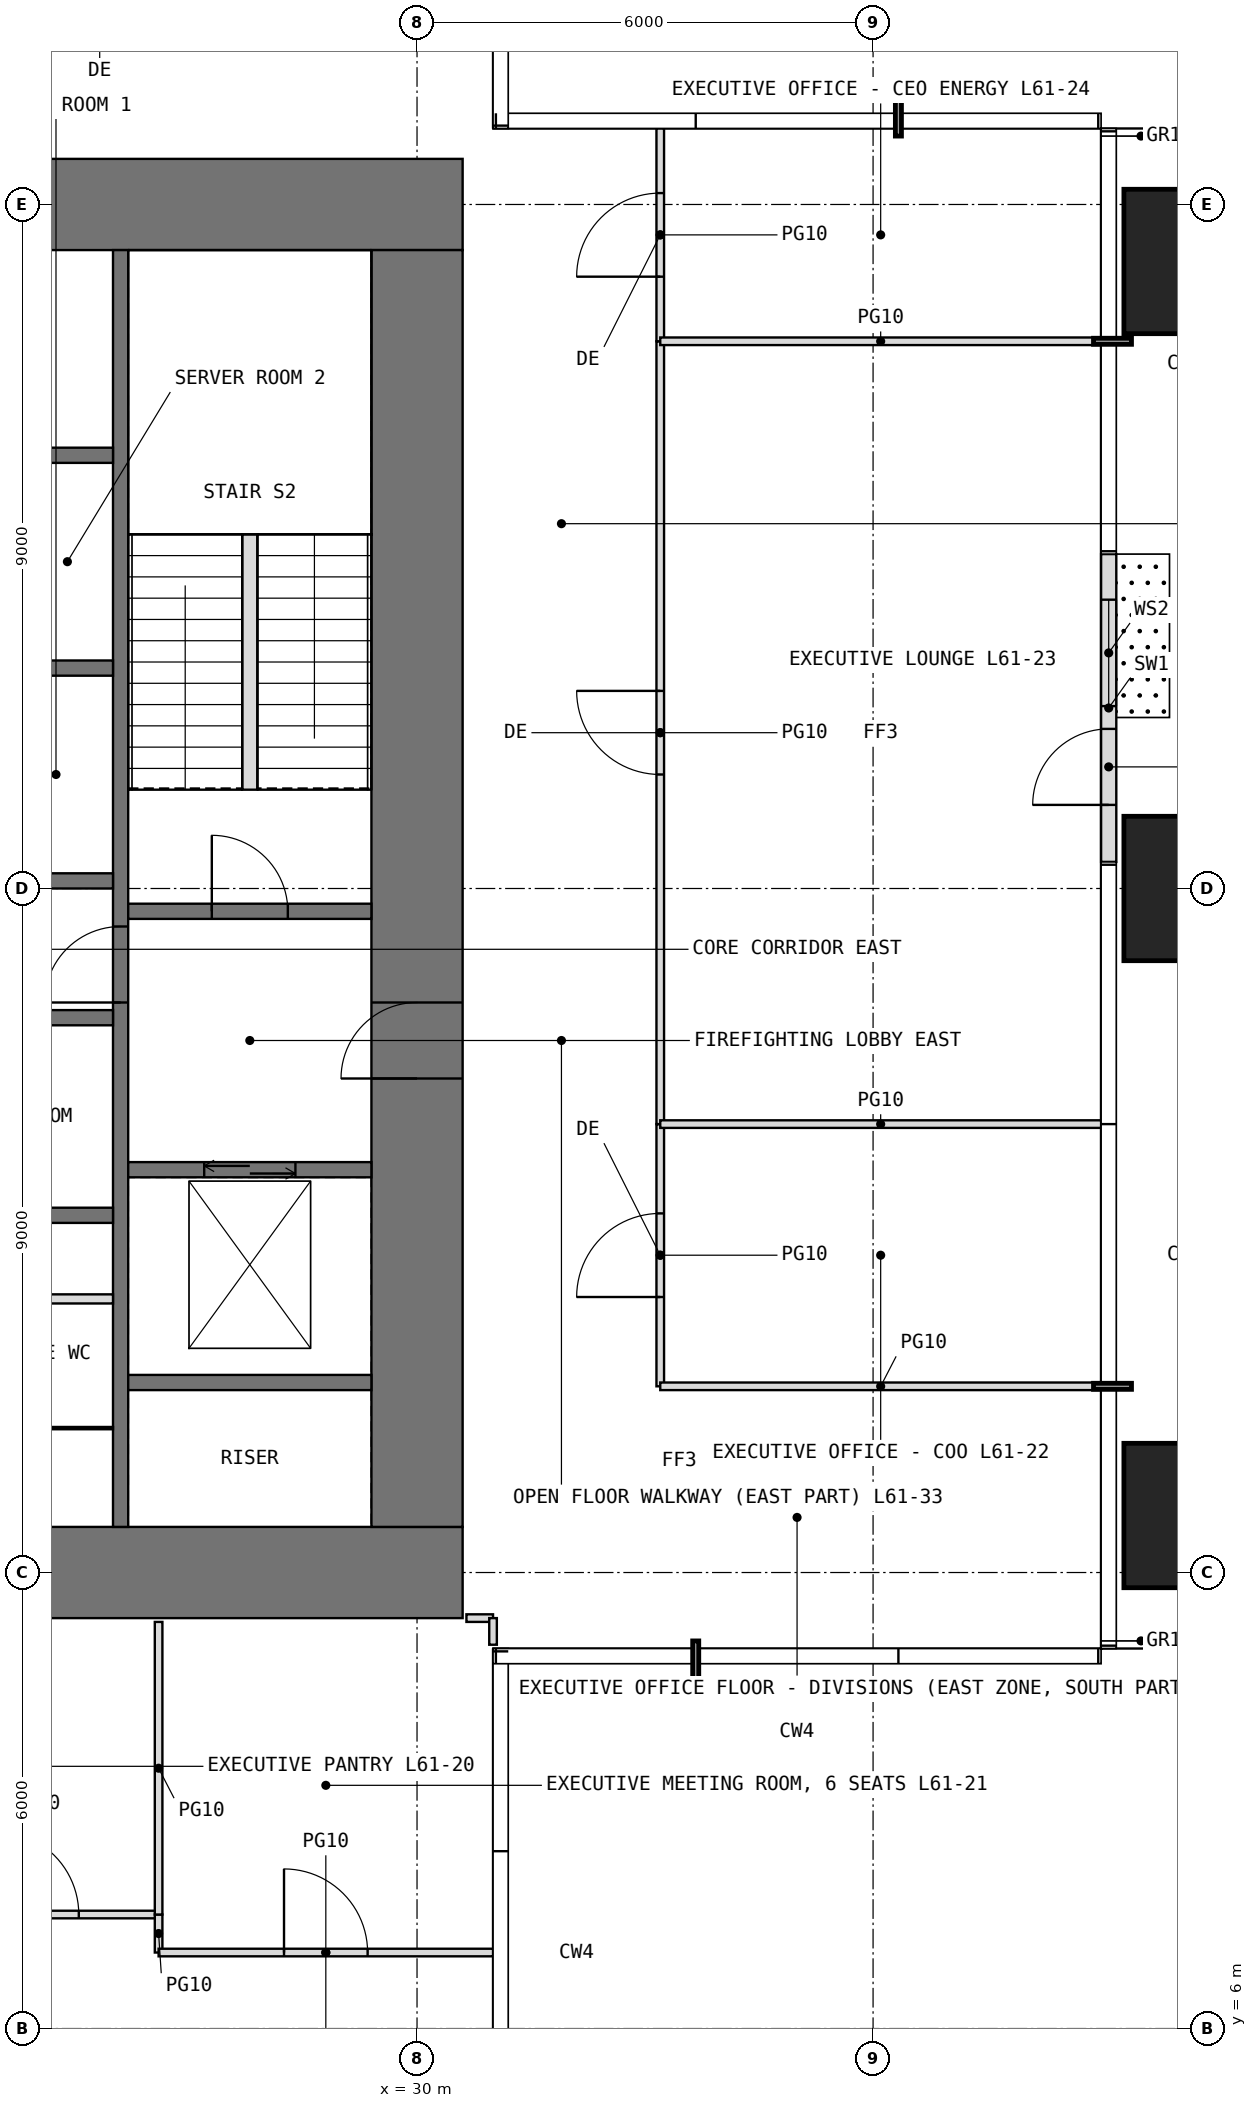
"""IFC4 building model, lengths in metres.
Left out: names, types, materials, properties, quantities, classifications, styles, units other than length and angle.
Written with IfcOpenShell. Run it as: python <this file> out.ifc"""

import sys

from ifc_helpers import new_model, si_unit, direction, frame, frame_2d, origin, origin_2d, place, context, subcontext, project, spatial, rectangle, extrude, element, fill, save


model = new_model("IFC4")
c1 = context("Model", 3, precision=1e-05, world=origin(), true_north=direction((0.0, 1.0)))
c2 = subcontext(c1, "Body", "Model", "MODEL_VIEW")
j1 = project(units=[si_unit("LENGTHUNIT", "METRE"), si_unit("PLANEANGLEUNIT", "RADIAN")], contexts=[c1])
p1 = place(None, origin())
s1 = spatial("IfcSite", under=j1, at=p1, CompositionType="ELEMENT")
p2 = place(p1, origin())
s2 = spatial("IfcBuilding", under=s1, at=p2, CompositionType="ELEMENT")
p3 = place(p2, frame((0.0, 0.0, 256.6)))
s3 = spatial("IfcBuildingStorey", under=s2, at=p3, CompositionType="ELEMENT", Elevation=256.6)
for number, where, z_axis, x_axis in (
    (1, (40.25, 12.75, 0.0), (0.0, 0.0, 1.0), (1.0, 0.0, 0.0)),
    (2, (40.25, 21.0, 0.0), (0.0, 0.0, 1.0), (1.0, 0.0, 0.0)),
    (3, (40.25, 29.25, 0.0), (0.0, 0.0, 1.0), (1.0, 0.0, 0.0)),
):
    element("IfcColumn", number, at=place(p3, frame(where, z_axis=z_axis, x_axis=x_axis)), inside=s3, PredefinedType="COLUMN", context=c2, shape_type="SweptSolid", body=[
        extrude(rectangle(XDim=1.9, YDim=1.9, at=origin_2d()), origin(), (0.0, 0.0, 1.0), 4.2),
    ])
p4 = place(p3, frame((39.1, 21.35, 0.0), z_axis=(0.0, 0.0, 1.0), x_axis=(0.0, 1.0, 0.0)))
e4 = element("IfcWall", 4, at=p4, inside=s3, PredefinedType="USERDEFINED", context=c2, shape_type="SweptSolid", body=[
    extrude(rectangle(XDim=4.05, YDim=0.2, at=frame_2d((2.025, 0.0))), origin(), (0.0, 0.0, 1.0), 3.95),
])
p5 = place(p4, frame((0.75, 0.0, 0.0)))
e5 = element("IfcOpeningElement", 5, at=p5, cuts=e4, PredefinedType="OPENING", context=c2, shape_type="SweptSolid", body=[
    extrude(rectangle(XDim=1.0, YDim=2.4, at=frame_2d((0.5, 1.2))), frame((0.0, 0.11, 0.0), z_axis=(0.0, -1.0, 0.0), x_axis=(1.0, 0.0, 0.0)), (0.0, 0.0, 1.0), 0.22),
])
p6 = place(p4, frame((2.05, 0.0, 0.3)))
e6 = element("IfcOpeningElement", 6, at=p6, cuts=e4, PredefinedType="OPENING", context=c2, shape_type="SweptSolid", body=[
    extrude(rectangle(XDim=1.4, YDim=2.7, at=frame_2d((0.7, 1.35))), frame((0.0, 0.11, 0.0), z_axis=(0.0, -1.0, 0.0), x_axis=(1.0, 0.0, 0.0)), (0.0, 0.0, 1.0), 0.22),
])
p7 = place(p3, frame((11.4, 12.0, -0.05), z_axis=(0.0, 0.0, 1.0), x_axis=(1.0, 0.0, 0.0)))
e7 = element("IfcWall", 7, at=p7, inside=s3, PredefinedType="SHEAR", context=c2, shape_type="SweptSolid", body=[
    extrude(rectangle(XDim=19.2, YDim=1.2, at=frame_2d((9.6, 0.0))), origin(), (0.0, 0.0, 1.0), 4.2),
])
p8 = place(p7, frame((8.6, 0.0, 0.05)))
e8 = element("IfcOpeningElement", 8, at=p8, cuts=e7, PredefinedType="OPENING", context=c2, shape_type="SweptSolid", body=[
    extrude(rectangle(XDim=2.0, YDim=2.2, at=frame_2d((1.0, 1.1))), frame((0.0, 0.61, 0.0), z_axis=(0.0, -1.0, 0.0), x_axis=(1.0, 0.0, 0.0)), (0.0, 0.0, 1.0), 1.22),
])
p9 = place(p3, frame((11.4, 30.0, -0.05), z_axis=(0.0, 0.0, 1.0), x_axis=(1.0, 0.0, 0.0)))
e9 = element("IfcWall", 9, at=p9, inside=s3, PredefinedType="SHEAR", context=c2, shape_type="SweptSolid", body=[
    extrude(rectangle(XDim=19.2, YDim=1.2, at=frame_2d((9.6, 0.0))), origin(), (0.0, 0.0, 1.0), 4.2),
])
p10 = place(p9, frame((8.6, 0.0, 0.05)))
e10 = element("IfcOpeningElement", 10, at=p10, cuts=e9, PredefinedType="OPENING", context=c2, shape_type="SweptSolid", body=[
    extrude(rectangle(XDim=2.0, YDim=2.2, at=frame_2d((1.0, 1.1))), frame((0.0, 0.61, 0.0), z_axis=(0.0, -1.0, 0.0), x_axis=(1.0, 0.0, 0.0)), (0.0, 0.0, 1.0), 1.22),
])
p11 = place(p3, frame((30.0, 12.6, -0.05), z_axis=(0.0, 0.0, 1.0), x_axis=(0.0, 1.0, 0.0)))
e11 = element("IfcWall", 11, at=p11, inside=s3, PredefinedType="SHEAR", context=c2, shape_type="SweptSolid", body=[
    extrude(rectangle(XDim=16.8, YDim=1.2, at=frame_2d((8.4, 0.0))), origin(), (0.0, 0.0, 1.0), 4.2),
])
p12 = place(p11, frame((5.9, 0.0, 0.05)))
e12 = element("IfcOpeningElement", 12, at=p12, cuts=e11, PredefinedType="OPENING", context=c2, shape_type="SweptSolid", body=[
    extrude(rectangle(XDim=1.0, YDim=2.2, at=frame_2d((0.5, 1.1))), frame((0.0, 0.61, 0.0), z_axis=(0.0, -1.0, 0.0), x_axis=(1.0, 0.0, 0.0)), (0.0, 0.0, 1.0), 1.22),
])
p13 = place(p3, frame((26.1, 12.6, -0.05), z_axis=(0.0, 0.0, 1.0), x_axis=(0.0, 1.0, 0.0)))
e13 = element("IfcWall", 13, at=p13, inside=s3, PredefinedType="SHEAR", context=c2, shape_type="SweptSolid", body=[
    extrude(rectangle(XDim=16.8, YDim=0.2, at=frame_2d((8.4, 0.0))), origin(), (0.0, 0.0, 1.0), 4.2),
])
p14 = place(p13, frame((6.9, 0.0, 0.05)))
e14 = element("IfcOpeningElement", 14, at=p14, cuts=e13, PredefinedType="OPENING", context=c2, shape_type="SweptSolid", body=[
    extrude(rectangle(XDim=1.0, YDim=2.2, at=frame_2d((0.5, 1.1))), frame((0.0, 0.11, 0.0), z_axis=(0.0, -1.0, 0.0), x_axis=(1.0, 0.0, 0.0)), (0.0, 0.0, 1.0), 0.22),
])
for number, where, z_axis, x_axis in (
    (15, (22.8, 16.7, -0.05), (0.0, 0.0, 1.0), (1.0, 0.0, 0.0)),
    (16, (22.8, 19.3, -0.05), (0.0, 0.0, 1.0), (1.0, 0.0, 0.0)),
    (17, (22.8, 21.1, -0.05), (0.0, 0.0, 1.0), (1.0, 0.0, 0.0)),
    (18, (22.8, 23.9, -0.05), (0.0, 0.0, 1.0), (1.0, 0.0, 0.0)),
    (19, (22.8, 26.7, -0.05), (0.0, 0.0, 1.0), (1.0, 0.0, 0.0)),
    (20, (26.2, 14.5, -0.05), (0.0, 0.0, 1.0), (1.0, 0.0, 0.0)),
):
    element("IfcWall", number, at=place(p3, frame(where, z_axis=z_axis, x_axis=x_axis)), inside=s3, PredefinedType="SHEAR", context=c2, shape_type="SweptSolid", body=[
        extrude(rectangle(XDim=3.2, YDim=0.2, at=frame_2d((1.6, 0.0))), origin(), (0.0, 0.0, 1.0), 4.2),
    ])
p15 = place(p3, frame((26.2, 17.3, -0.05), z_axis=(0.0, 0.0, 1.0), x_axis=(1.0, 0.0, 0.0)))
e21 = element("IfcWall", 21, at=p15, inside=s3, PredefinedType="SHEAR", context=c2, shape_type="SweptSolid", body=[
    extrude(rectangle(XDim=3.2, YDim=0.2, at=frame_2d((1.6, 0.0))), origin(), (0.0, 0.0, 1.0), 4.2),
])
p16 = place(p15, frame((1.0, 0.0, 0.05)))
e22 = element("IfcOpeningElement", 22, at=p16, cuts=e21, PredefinedType="OPENING", context=c2, shape_type="SweptSolid", body=[
    extrude(rectangle(XDim=1.2, YDim=2.2, at=frame_2d((0.6, 1.1))), frame((0.0, 0.11, 0.0), z_axis=(0.0, -1.0, 0.0), x_axis=(1.0, 0.0, 0.0)), (0.0, 0.0, 1.0), 0.22),
])
p17 = place(p3, frame((26.2, 20.7, -0.05), z_axis=(0.0, 0.0, 1.0), x_axis=(1.0, 0.0, 0.0)))
e23 = element("IfcWall", 23, at=p17, inside=s3, PredefinedType="SHEAR", context=c2, shape_type="SweptSolid", body=[
    extrude(rectangle(XDim=3.2, YDim=0.2, at=frame_2d((1.6, 0.0))), origin(), (0.0, 0.0, 1.0), 4.2),
])
p18 = place(p17, frame((1.1, 0.0, 0.05)))
e24 = element("IfcOpeningElement", 24, at=p18, cuts=e23, PredefinedType="OPENING", context=c2, shape_type="SweptSolid", body=[
    extrude(rectangle(XDim=1.0, YDim=2.2, at=frame_2d((0.5, 1.1))), frame((0.0, 0.11, 0.0), z_axis=(0.0, -1.0, 0.0), x_axis=(1.0, 0.0, 0.0)), (0.0, 0.0, 1.0), 0.22),
])
p19 = place(p3, frame((22.8, 15.6, 0.0), z_axis=(0.0, 0.0, 1.0), x_axis=(1.0, 0.0, 0.0)))
e25 = element("IfcWall", 25, at=p19, inside=s3, PredefinedType="PARTITIONING", context=c2, shape_type="SweptSolid", body=[
    extrude(rectangle(XDim=3.2, YDim=0.12, at=frame_2d((1.6, 0.0))), origin(), (0.0, 0.0, 1.0), 3.95),
])
p20 = place(p3, frame((24.6, 13.9, 0.0), z_axis=(0.0, 0.0, 1.0), x_axis=(1.0, 0.0, 0.0)))
e26 = element("IfcWall", 26, at=p20, inside=s3, PredefinedType="PARTITIONING", context=c2, shape_type="SweptSolid", body=[
    extrude(rectangle(XDim=1.4, YDim=0.03, at=frame_2d((0.7, 0.0))), origin(), (0.0, 0.0, 1.0), 3.95),
])
p21 = place(p3, frame((23.4, 7.5, 0.0), z_axis=(0.0, 0.0, 1.0), x_axis=(1.0, 0.0, 0.0)))
e27 = element("IfcWall", 27, at=p21, inside=s3, PredefinedType="PARTITIONING", context=c2, shape_type="SweptSolid", body=[
    extrude(rectangle(XDim=3.2, YDim=0.1, at=frame_2d((1.6, 0.0))), origin(), (0.0, 0.0, 1.0), 3.95),
])
p22 = place(p21, frame((1.05, 0.0, 0.0)))
e28 = element("IfcOpeningElement", 28, at=p22, cuts=e27, PredefinedType="OPENING", context=c2, shape_type="SweptSolid", body=[
    extrude(rectangle(XDim=1.1, YDim=2.3, at=frame_2d((0.55, 1.15))), frame((0.0, 0.06, 0.0), z_axis=(0.0, -1.0, 0.0), x_axis=(1.0, 0.0, 0.0)), (0.0, 0.0, 1.0), 0.12),
])
p23 = place(p3, frame((26.6, 7.0, 0.0), z_axis=(0.0, 0.0, 1.0), x_axis=(0.0, 1.0, 0.0)))
e29 = element("IfcWall", 29, at=p23, inside=s3, PredefinedType="PARTITIONING", context=c2, shape_type="SweptSolid", body=[
    extrude(rectangle(XDim=0.5, YDim=0.1, at=frame_2d((0.25, 0.0))), origin(), (0.0, 0.0, 1.0), 3.95),
])
p24 = place(p3, frame((26.6, 7.0, 0.0), z_axis=(0.0, 0.0, 1.0), x_axis=(1.0, 0.0, 0.0)))
e30 = element("IfcWall", 30, at=p24, inside=s3, PredefinedType="PARTITIONING", context=c2, shape_type="SweptSolid", body=[
    extrude(rectangle(XDim=4.4, YDim=0.1, at=frame_2d((2.2, 0.0))), origin(), (0.0, 0.0, 1.0), 3.95),
])
p25 = place(p24, frame((1.65, 0.0, 0.0)))
e31 = element("IfcOpeningElement", 31, at=p25, cuts=e30, PredefinedType="OPENING", context=c2, shape_type="SweptSolid", body=[
    extrude(rectangle(XDim=1.1, YDim=2.3, at=frame_2d((0.55, 1.15))), frame((0.0, 0.06, 0.0), z_axis=(0.0, -1.0, 0.0), x_axis=(1.0, 0.0, 0.0)), (0.0, 0.0, 1.0), 0.12),
])
p26 = place(p3, frame((26.6, 7.5, 0.0), z_axis=(0.0, 0.0, 1.0), x_axis=(0.0, 1.0, 0.0)))
e32 = element("IfcWall", 32, at=p26, inside=s3, PredefinedType="PARTITIONING", context=c2, shape_type="SweptSolid", body=[
    extrude(rectangle(XDim=3.85, YDim=0.1, at=frame_2d((1.925, 0.0))), origin(), (0.0, 0.0, 1.0), 3.95),
])
p27 = place(p3, frame((30.65, 11.4, 0.0), z_axis=(0.0, 0.0, 1.0), x_axis=(1.0, 0.0, 0.0)))
e33 = element("IfcWall", 33, at=p27, inside=s3, PredefinedType="PARTITIONING", context=c2, shape_type="SweptSolid", body=[
    extrude(rectangle(XDim=0.35, YDim=0.1, at=frame_2d((0.175, 0.0))), origin(), (0.0, 0.0, 1.0), 3.95),
])
p28 = place(p3, frame((31.0, 11.05, 0.0), z_axis=(0.0, 0.0, 1.0), x_axis=(0.0, 1.0, 0.0)))
e34 = element("IfcWall", 34, at=p28, inside=s3, PredefinedType="PARTITIONING", context=c2, shape_type="SweptSolid", body=[
    extrude(rectangle(XDim=0.35, YDim=0.1, at=frame_2d((0.175, 0.0))), origin(), (0.0, 0.0, 1.0), 3.95),
])
p29 = place(p3, frame((33.2, 14.45, 0.0), z_axis=(0.0, 0.0, 1.0), x_axis=(0.0, 1.0, 0.0)))
e35 = element("IfcWall", 35, at=p29, inside=s3, PredefinedType="PARTITIONING", context=c2, shape_type="SweptSolid", body=[
    extrude(rectangle(XDim=3.45, YDim=0.1, at=frame_2d((1.725, 0.0))), origin(), (0.0, 0.0, 1.0), 3.95),
])
p30 = place(p29, frame((1.175, 0.0, 0.0)))
e36 = element("IfcOpeningElement", 36, at=p30, cuts=e35, PredefinedType="OPENING", context=c2, shape_type="SweptSolid", body=[
    extrude(rectangle(XDim=1.1, YDim=2.3, at=frame_2d((0.55, 1.15))), frame((0.0, 0.06, 0.0), z_axis=(0.0, -1.0, 0.0), x_axis=(1.0, 0.0, 0.0)), (0.0, 0.0, 1.0), 0.12),
])
p31 = place(p3, frame((33.2, 14.45, 0.0), z_axis=(0.0, 0.0, 1.0), x_axis=(1.0, 0.0, 0.0)))
e37 = element("IfcWall", 37, at=p31, inside=s3, PredefinedType="PARTITIONING", context=c2, shape_type="SweptSolid", body=[
    extrude(rectangle(XDim=5.8, YDim=0.1, at=frame_2d((2.9, 0.0))), origin(), (0.0, 0.0, 1.0), 3.95),
])
p32 = place(p3, frame((33.2, 17.9, 0.0), z_axis=(0.0, 0.0, 1.0), x_axis=(0.0, 1.0, 0.0)))
e38 = element("IfcWall", 38, at=p32, inside=s3, PredefinedType="PARTITIONING", context=c2, shape_type="SweptSolid", body=[
    extrude(rectangle(XDim=10.3, YDim=0.1, at=frame_2d((5.15, 0.0))), origin(), (0.0, 0.0, 1.0), 3.95),
])
p33 = place(p32, frame((4.6, 0.0, 0.0)))
e39 = element("IfcOpeningElement", 39, at=p33, cuts=e38, PredefinedType="OPENING", context=c2, shape_type="SweptSolid", body=[
    extrude(rectangle(XDim=1.1, YDim=2.3, at=frame_2d((0.55, 1.15))), frame((0.0, 0.06, 0.0), z_axis=(0.0, -1.0, 0.0), x_axis=(1.0, 0.0, 0.0)), (0.0, 0.0, 1.0), 0.12),
])
p34 = place(p3, frame((33.2, 17.9, 0.0), z_axis=(0.0, 0.0, 1.0), x_axis=(1.0, 0.0, 0.0)))
e40 = element("IfcWall", 40, at=p34, inside=s3, PredefinedType="PARTITIONING", context=c2, shape_type="SweptSolid", body=[
    extrude(rectangle(XDim=5.8, YDim=0.1, at=frame_2d((2.9, 0.0))), origin(), (0.0, 0.0, 1.0), 3.95),
])
p35 = place(p3, frame((33.2, 28.2, 0.0), z_axis=(0.0, 0.0, 1.0), x_axis=(0.0, 1.0, 0.0)))
e41 = element("IfcWall", 41, at=p35, inside=s3, PredefinedType="PARTITIONING", context=c2, shape_type="SweptSolid", body=[
    extrude(rectangle(XDim=2.8, YDim=0.1, at=frame_2d((1.4, 0.0))), origin(), (0.0, 0.0, 1.0), 3.95),
])
p36 = place(p35, frame((0.85, 0.0, 0.0)))
e42 = element("IfcOpeningElement", 42, at=p36, cuts=e41, PredefinedType="OPENING", context=c2, shape_type="SweptSolid", body=[
    extrude(rectangle(XDim=1.1, YDim=2.3, at=frame_2d((0.55, 1.15))), frame((0.0, 0.06, 0.0), z_axis=(0.0, -1.0, 0.0), x_axis=(1.0, 0.0, 0.0)), (0.0, 0.0, 1.0), 0.12),
])
p37 = place(p3, frame((33.2, 28.2, 0.0), z_axis=(0.0, 0.0, 1.0), x_axis=(1.0, 0.0, 0.0)))
e43 = element("IfcWall", 43, at=p37, inside=s3, PredefinedType="PARTITIONING", context=c2, shape_type="SweptSolid", body=[
    extrude(rectangle(XDim=5.8, YDim=0.1, at=frame_2d((2.9, 0.0))), origin(), (0.0, 0.0, 1.0), 3.95),
])
p38 = place(p3, frame((27.8, 22.3, 0.0), z_axis=(0.0, 0.0, 1.0), x_axis=(0.0, 1.0, 0.0)))
e44 = element("IfcWall", 44, at=p38, inside=s3, PredefinedType="PARTITIONING", context=c2, shape_type="SweptSolid", body=[
    extrude(rectangle(XDim=3.36, YDim=0.2, at=frame_2d((1.68, 0.0))), origin(), (0.0, 0.0, 1.0), 4.2),
])
p39 = place(p5, origin())
e45 = element("IfcDoor", 45, at=p39, inside=s3, OperationType="SINGLE_SWING_LEFT", PredefinedType="DOOR", context=c2, shape_type="SweptSolid", body=[
    extrude(rectangle(XDim=1.0, YDim=2.4, at=frame_2d((0.5, 1.2))), frame((0.0, 0.025, 0.0), z_axis=(0.0, -1.0, 0.0), x_axis=(1.0, 0.0, 0.0)), (0.0, 0.0, 1.0), 0.05),
])
fill(e5, e45)
p40 = place(p6, origin())
e46 = element("IfcWindow", 46, at=p40, inside=s3, PartitioningType="SINGLE_PANEL", PredefinedType="WINDOW", context=c2, shape_type="SweptSolid", body=[
    extrude(rectangle(XDim=1.4, YDim=2.7, at=frame_2d((0.7, 1.35))), frame((0.0, 0.03, 0.0), z_axis=(0.0, -1.0, 0.0), x_axis=(1.0, 0.0, 0.0)), (0.0, 0.0, 1.0), 0.06),
])
fill(e6, e46)
p41 = place(p12, origin())
e47 = element("IfcDoor", 47, at=p41, inside=s3, OperationType="SINGLE_SWING_LEFT", PredefinedType="DOOR", context=c2, shape_type="SweptSolid", body=[
    extrude(rectangle(XDim=1.0, YDim=2.2, at=frame_2d((0.5, 1.1))), frame((0.0, 0.025, 0.0), z_axis=(0.0, -1.0, 0.0), x_axis=(1.0, 0.0, 0.0)), (0.0, 0.0, 1.0), 0.05),
])
fill(e12, e47)
p42 = place(p18, origin())
e48 = element("IfcDoor", 48, at=p42, inside=s3, OperationType="SINGLE_SWING_LEFT", PredefinedType="DOOR", context=c2, shape_type="SweptSolid", body=[
    extrude(rectangle(XDim=1.0, YDim=2.2, at=frame_2d((0.5, 1.1))), frame((0.0, 0.025, 0.0), z_axis=(0.0, -1.0, 0.0), x_axis=(1.0, 0.0, 0.0)), (0.0, 0.0, 1.0), 0.05),
])
fill(e24, e48)
p43 = place(p14, origin())
e49 = element("IfcDoor", 49, at=p43, inside=s3, OperationType="SINGLE_SWING_LEFT", PredefinedType="DOOR", context=c2, shape_type="SweptSolid", body=[
    extrude(rectangle(XDim=1.0, YDim=2.2, at=frame_2d((0.5, 1.1))), frame((0.0, 0.025, 0.0), z_axis=(0.0, -1.0, 0.0), x_axis=(1.0, 0.0, 0.0)), (0.0, 0.0, 1.0), 0.05),
])
fill(e14, e49)
p44 = place(p22, origin())
e50 = element("IfcDoor", 50, at=p44, inside=s3, OperationType="SINGLE_SWING_LEFT", PredefinedType="DOOR", context=c2, shape_type="SweptSolid", body=[
    extrude(rectangle(XDim=1.1, YDim=2.3, at=frame_2d((0.55, 1.15))), frame((0.0, 0.025, 0.0), z_axis=(0.0, -1.0, 0.0), x_axis=(1.0, 0.0, 0.0)), (0.0, 0.0, 1.0), 0.05),
])
fill(e28, e50)
p45 = place(p25, origin())
e51 = element("IfcDoor", 51, at=p45, inside=s3, OperationType="SINGLE_SWING_LEFT", PredefinedType="DOOR", context=c2, shape_type="SweptSolid", body=[
    extrude(rectangle(XDim=1.1, YDim=2.3, at=frame_2d((0.55, 1.15))), frame((0.0, 0.025, 0.0), z_axis=(0.0, -1.0, 0.0), x_axis=(1.0, 0.0, 0.0)), (0.0, 0.0, 1.0), 0.05),
])
fill(e31, e51)
p46 = place(p30, origin())
e52 = element("IfcDoor", 52, at=p46, inside=s3, OperationType="SINGLE_SWING_LEFT", PredefinedType="DOOR", context=c2, shape_type="SweptSolid", body=[
    extrude(rectangle(XDim=1.1, YDim=2.3, at=frame_2d((0.55, 1.15))), frame((0.0, 0.025, 0.0), z_axis=(0.0, -1.0, 0.0), x_axis=(1.0, 0.0, 0.0)), (0.0, 0.0, 1.0), 0.05),
])
fill(e36, e52)
p47 = place(p33, origin())
e53 = element("IfcDoor", 53, at=p47, inside=s3, OperationType="SINGLE_SWING_RIGHT", PredefinedType="DOOR", context=c2, shape_type="SweptSolid", body=[
    extrude(rectangle(XDim=1.1, YDim=2.3, at=frame_2d((0.55, 1.15))), frame((0.0, 0.025, 0.0), z_axis=(0.0, -1.0, 0.0), x_axis=(1.0, 0.0, 0.0)), (0.0, 0.0, 1.0), 0.05),
])
fill(e39, e53)
p48 = place(p36, origin())
e54 = element("IfcDoor", 54, at=p48, inside=s3, OperationType="SINGLE_SWING_LEFT", PredefinedType="DOOR", context=c2, shape_type="SweptSolid", body=[
    extrude(rectangle(XDim=1.1, YDim=2.3, at=frame_2d((0.55, 1.15))), frame((0.0, 0.025, 0.0), z_axis=(0.0, -1.0, 0.0), x_axis=(1.0, 0.0, 0.0)), (0.0, 0.0, 1.0), 0.05),
])
fill(e42, e54)
p49 = place(p16, origin())
e55 = element("IfcDoor", 55, at=p49, inside=s3, OperationType="DOUBLE_DOOR_SLIDING", PredefinedType="DOOR", context=c2, shape_type="SweptSolid", body=[
    extrude(rectangle(XDim=1.2, YDim=2.2, at=frame_2d((0.6, 1.1))), frame((0.0, 0.025, 0.0), z_axis=(0.0, -1.0, 0.0), x_axis=(1.0, 0.0, 0.0)), (0.0, 0.0, 1.0), 0.05),
])
fill(e22, e55)
save(model, sys.argv[1])
